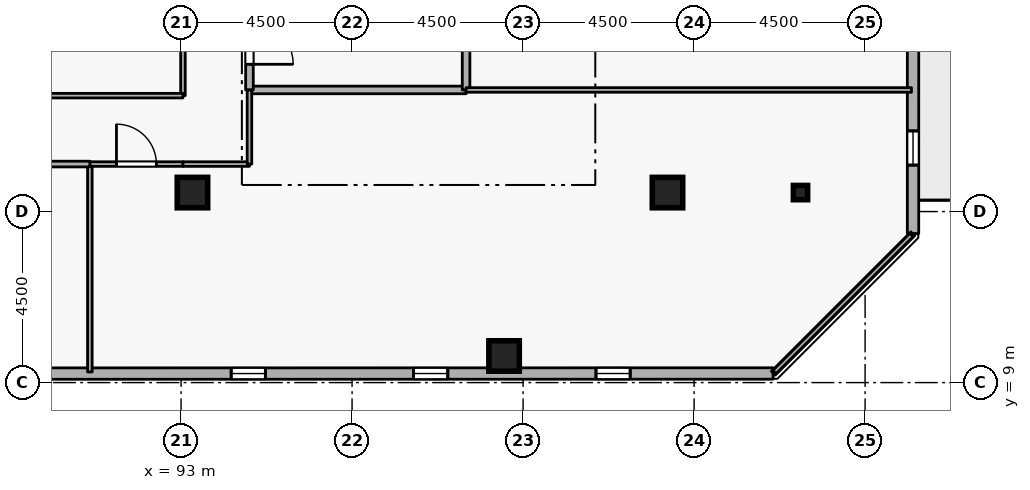
"""IFC4 building model, lengths in metres.
Left out: names, types, materials, properties, quantities, classifications, styles, units other than length and angle.
Written with IfcOpenShell. Run it as: python <this file> out.ifc"""

import sys

from ifc_helpers import new_model, si_unit, direction, frame, frame_2d, origin, origin_2d, place, context, subcontext, project, spatial, rectangle, i_section, extrude, element, fill, save


model = new_model("IFC4")
c1 = context("Model", 3, precision=1e-05, world=origin(), true_north=direction((0.0, 1.0)))
c2 = subcontext(c1, "Body", "Model", "MODEL_VIEW")
j1 = project(units=[si_unit("LENGTHUNIT", "METRE"), si_unit("PLANEANGLEUNIT", "RADIAN")], contexts=[c1])
p1 = place(None, origin())
s1 = spatial("IfcSite", under=j1, at=p1, CompositionType="ELEMENT")
p2 = place(p1, origin())
s2 = spatial("IfcBuilding", under=s1, at=p2, CompositionType="ELEMENT")
p3 = place(p2, frame((0.0, 0.0, 261.9)))
s3 = spatial("IfcBuildingStorey", under=s2, at=p3, CompositionType="ELEMENT", Elevation=261.9)
for number, where, z_axis, x_axis in (
    (1, (105.8, 14.0, 0.0), (0.0, 0.0, 1.0), (1.0, 0.0, 0.0)),
    (2, (101.5, 9.7, 0.0), (0.0, 0.0, 1.0), (1.0, 0.0, 0.0)),
    (3, (93.3, 14.0, 0.0), (0.0, 0.0, 1.0), (1.0, 0.0, 0.0)),
):
    element("IfcColumn", number, at=place(p3, frame(where, z_axis=z_axis, x_axis=x_axis)), inside=s3, PredefinedType="COLUMN", context=c2, shape_type="SweptSolid", body=[
        extrude(rectangle(XDim=0.8, YDim=0.8, at=origin_2d()), origin(), (0.0, 0.0, 1.0), 3.6),
    ])
p4 = place(p3, frame((109.3, 14.0, 0.0), z_axis=(0.0, 0.0, 1.0), x_axis=(1.0, 0.0, 0.0)))
e4 = element("IfcColumn", 4, at=p4, inside=s3, PredefinedType="COLUMN", context=c2, shape_type="SweptSolid", body=[
    extrude(i_section(OverallWidth=0.375, OverallDepth=0.375, WebThickness=0.017, FlangeThickness=0.027, FilletRadius=0.015, at=origin_2d()), origin(), (0.0, 0.0, 1.0), 3.6),
])
p5 = place(p3, frame((73.319, 9.235, 0.0), z_axis=(0.0, 0.0, 1.0), x_axis=(0.999999994606, 0.000103863011, 0.0)))
e5 = element("IfcWall", 5, at=p5, inside=s3, PredefinedType="STANDARD", context=c2, shape_type="SweptSolid", body=[
    extrude(rectangle(XDim=35.259, YDim=0.3, at=frame_2d((17.629, 0.0))), origin(), (0.0, 0.0, 1.0), 2.7),
])
p6 = place(p5, frame((6.6, 0.0, 0.72)))
e6 = element("IfcOpeningElement", 6, at=p6, cuts=e5, PredefinedType="OPENING", context=c2, shape_type="SweptSolid", body=[
    extrude(rectangle(XDim=0.9, YDim=1.75, at=frame_2d((0.45, 0.875))), frame((0.0, 0.16, 0.0), z_axis=(0.0, -1.0, 0.0), x_axis=(1.0, 0.0, 0.0)), (0.0, 0.0, 1.0), 0.32),
])
p7 = place(p5, frame((11.4, 0.0, 0.72)))
e7 = element("IfcOpeningElement", 7, at=p7, cuts=e5, PredefinedType="OPENING", context=c2, shape_type="SweptSolid", body=[
    extrude(rectangle(XDim=0.9, YDim=1.75, at=frame_2d((0.45, 0.875))), frame((0.0, 0.16, 0.0), z_axis=(0.0, -1.0, 0.0), x_axis=(1.0, 0.0, 0.0)), (0.0, 0.0, 1.0), 0.32),
])
p8 = place(p5, frame((21.0, 0.0, 0.72)))
e8 = element("IfcOpeningElement", 8, at=p8, cuts=e5, PredefinedType="OPENING", context=c2, shape_type="SweptSolid", body=[
    extrude(rectangle(XDim=0.9, YDim=1.75, at=frame_2d((0.45, 0.875))), frame((0.0, 0.16, 0.0), z_axis=(0.0, -1.0, 0.0), x_axis=(1.0, 0.0, 0.0)), (0.0, 0.0, 1.0), 0.32),
])
p9 = place(p5, frame((25.8, 0.0, 0.72)))
e9 = element("IfcOpeningElement", 9, at=p9, cuts=e5, PredefinedType="OPENING", context=c2, shape_type="SweptSolid", body=[
    extrude(rectangle(XDim=0.9, YDim=1.75, at=frame_2d((0.45, 0.875))), frame((0.0, 0.16, 0.0), z_axis=(0.0, -1.0, 0.0), x_axis=(1.0, 0.0, 0.0)), (0.0, 0.0, 1.0), 0.32),
])
p10 = place(p5, frame((30.6, 0.0, 0.72)))
e10 = element("IfcOpeningElement", 10, at=p10, cuts=e5, PredefinedType="OPENING", context=c2, shape_type="SweptSolid", body=[
    extrude(rectangle(XDim=0.9, YDim=1.75, at=frame_2d((0.45, 0.875))), frame((0.0, 0.16, 0.0), z_axis=(0.0, -1.0, 0.0), x_axis=(1.0, 0.0, 0.0)), (0.0, 0.0, 1.0), 0.32),
])
p11 = place(p3, frame((112.261, 12.922, 0.0), z_axis=(0.0, 0.0, 1.0), x_axis=(0.000103863011, 0.999999994606, 0.0)))
e11 = element("IfcWall", 11, at=p11, inside=s3, PredefinedType="STANDARD", context=c2, shape_type="SweptSolid", body=[
    extrude(rectangle(XDim=35.259, YDim=0.3, at=frame_2d((17.629, 0.0))), origin(), (0.0, 0.0, 1.0), 2.7),
])
p12 = place(p11, frame((22.58, 0.0, 0.0)))
e12 = element("IfcOpeningElement", 12, at=p12, cuts=e11, PredefinedType="OPENING", context=c2, shape_type="SweptSolid", body=[
    extrude(rectangle(XDim=1.0, YDim=2.08, at=frame_2d((0.5, 1.04))), frame((0.0, 0.16, 0.0), z_axis=(0.0, -1.0, 0.0), x_axis=(1.0, 0.0, 0.0)), (0.0, 0.0, 1.0), 0.32),
])
p13 = place(p11, frame((1.8, 0.0, 0.72)))
e13 = element("IfcOpeningElement", 13, at=p13, cuts=e11, PredefinedType="OPENING", context=c2, shape_type="SweptSolid", body=[
    extrude(rectangle(XDim=0.9, YDim=1.75, at=frame_2d((0.45, 0.875))), frame((0.0, 0.16, 0.0), z_axis=(0.0, -1.0, 0.0), x_axis=(1.0, 0.0, 0.0)), (0.0, 0.0, 1.0), 0.32),
])
p14 = place(p11, frame((6.6, 0.0, 0.72)))
e14 = element("IfcOpeningElement", 14, at=p14, cuts=e11, PredefinedType="OPENING", context=c2, shape_type="SweptSolid", body=[
    extrude(rectangle(XDim=0.9, YDim=1.75, at=frame_2d((0.45, 0.875))), frame((0.0, 0.16, 0.0), z_axis=(0.0, -1.0, 0.0), x_axis=(1.0, 0.0, 0.0)), (0.0, 0.0, 1.0), 0.32),
])
p15 = place(p11, frame((11.4, 0.0, 0.72)))
e15 = element("IfcOpeningElement", 15, at=p15, cuts=e11, PredefinedType="OPENING", context=c2, shape_type="SweptSolid", body=[
    extrude(rectangle(XDim=0.9, YDim=1.75, at=frame_2d((0.45, 0.875))), frame((0.0, 0.16, 0.0), z_axis=(0.0, -1.0, 0.0), x_axis=(1.0, 0.0, 0.0)), (0.0, 0.0, 1.0), 0.32),
])
p16 = place(p11, frame((16.2, 0.0, 0.72)))
e16 = element("IfcOpeningElement", 16, at=p16, cuts=e11, PredefinedType="OPENING", context=c2, shape_type="SweptSolid", body=[
    extrude(rectangle(XDim=0.9, YDim=1.75, at=frame_2d((0.45, 0.875))), frame((0.0, 0.16, 0.0), z_axis=(0.0, -1.0, 0.0), x_axis=(1.0, 0.0, 0.0)), (0.0, 0.0, 1.0), 0.32),
])
p17 = place(p11, frame((25.8, 0.0, 0.72)))
e17 = element("IfcOpeningElement", 17, at=p17, cuts=e11, PredefinedType="OPENING", context=c2, shape_type="SweptSolid", body=[
    extrude(rectangle(XDim=0.9, YDim=1.75, at=frame_2d((0.45, 0.875))), frame((0.0, 0.16, 0.0), z_axis=(0.0, -1.0, 0.0), x_axis=(1.0, 0.0, 0.0)), (0.0, 0.0, 1.0), 0.32),
])
p18 = place(p11, frame((30.6, 0.0, 0.72)))
e18 = element("IfcOpeningElement", 18, at=p18, cuts=e11, PredefinedType="OPENING", context=c2, shape_type="SweptSolid", body=[
    extrude(rectangle(XDim=0.9, YDim=1.75, at=frame_2d((0.45, 0.875))), frame((0.0, 0.16, 0.0), z_axis=(0.0, -1.0, 0.0), x_axis=(1.0, 0.0, 0.0)), (0.0, 0.0, 1.0), 0.32),
])
p19 = place(p3, frame((94.8, 16.7, 0.0), z_axis=(0.0, 0.0, 1.0), x_axis=(1.0, 0.0, 0.0)))
e19 = element("IfcWall", 19, at=p19, inside=s3, PredefinedType="STANDARD", context=c2, shape_type="SweptSolid", body=[
    extrude(rectangle(XDim=5.7, YDim=0.2, at=frame_2d((2.85, 0.0))), origin(), (0.0, 0.0, 1.0), 3.34),
])
p20 = place(p3, frame((100.5, 16.7, 0.0), z_axis=(0.0, 0.0, 1.0), x_axis=(0.0, 1.0, 0.0)))
e20 = element("IfcWall", 20, at=p20, inside=s3, PredefinedType="STANDARD", context=c2, shape_type="SweptSolid", body=[
    extrude(rectangle(XDim=2.5, YDim=0.2, at=frame_2d((1.25, 0.0))), origin(), (0.0, 0.0, 1.0), 3.34),
])
p21 = place(p3, frame((94.8, 19.2, 0.0), z_axis=(0.0, 0.0, 1.0), x_axis=(0.0, -1.0, 0.0)))
e21 = element("IfcWall", 21, at=p21, inside=s3, PredefinedType="STANDARD", context=c2, shape_type="SweptSolid", body=[
    extrude(rectangle(XDim=2.5, YDim=0.2, at=frame_2d((1.25, 0.0))), origin(), (0.0, 0.0, 1.0), 3.34),
])
p22 = place(p21, frame((0.675, 0.0, 0.0)))
e22 = element("IfcOpeningElement", 22, at=p22, cuts=e21, PredefinedType="OPENING", context=c2, shape_type="SweptSolid", body=[
    extrude(rectangle(XDim=1.15, YDim=2.1, at=frame_2d((0.575, 1.05))), frame((0.0, 0.11, 0.0), z_axis=(0.0, -1.0, 0.0), x_axis=(1.0, 0.0, 0.0)), (0.0, 0.0, 1.0), 0.22),
])
p23 = place(p3, frame((90.6, 9.28, 0.0), z_axis=(0.0, 0.0, 1.0), x_axis=(0.0, 1.0, 0.0)))
e23 = element("IfcWall", 23, at=p23, inside=s3, PredefinedType="PARTITIONING", context=c2, shape_type="SweptSolid", body=[
    extrude(rectangle(XDim=5.47, YDim=0.12, at=frame_2d((2.735, 0.0))), origin(), (0.0, 0.0, 1.0), 3.34),
])
p24 = place(p3, frame((90.6, 14.75, 0.0), z_axis=(0.0, 0.0, 1.0), x_axis=(1.0, 0.0, 0.0)))
e24 = element("IfcWall", 24, at=p24, inside=s3, PredefinedType="PARTITIONING", context=c2, shape_type="SweptSolid", body=[
    extrude(rectangle(XDim=2.45, YDim=0.12, at=frame_2d((1.225, 0.0))), origin(), (0.0, 0.0, 1.0), 3.34),
])
p25 = place(p24, frame((0.7, 0.0, 0.0)))
e25 = element("IfcOpeningElement", 25, at=p25, cuts=e24, PredefinedType="OPENING", context=c2, shape_type="SweptSolid", body=[
    extrude(rectangle(XDim=1.05, YDim=2.1, at=frame_2d((0.525, 1.05))), frame((0.0, 0.07, 0.0), z_axis=(0.0, -1.0, 0.0), x_axis=(1.0, 0.0, 0.0)), (0.0, 0.0, 1.0), 0.14),
])
p26 = place(p3, frame((93.05, 14.75, 0.0), z_axis=(0.0, 0.0, 1.0), x_axis=(1.0, 0.0, 0.0)))
e26 = element("IfcWall", 26, at=p26, inside=s3, PredefinedType="PARTITIONING", context=c2, shape_type="SweptSolid", body=[
    extrude(rectangle(XDim=1.75, YDim=0.12, at=frame_2d((0.875, 0.0))), origin(), (0.0, 0.0, 1.0), 3.34),
])
p27 = place(p3, frame((94.8, 14.75, 0.0), z_axis=(0.0, 0.0, 1.0), x_axis=(0.0, 1.0, 0.0)))
e27 = element("IfcWall", 27, at=p27, inside=s3, PredefinedType="PARTITIONING", context=c2, shape_type="SweptSolid", body=[
    extrude(rectangle(XDim=1.95, YDim=0.12, at=frame_2d((0.975, 0.0))), origin(), (0.0, 0.0, 1.0), 3.34),
])
p28 = place(p3, frame((100.5, 16.7, 0.0), z_axis=(0.0, 0.0, 1.0), x_axis=(1.0, 0.0, 0.0)))
e28 = element("IfcWall", 28, at=p28, inside=s3, PredefinedType="PARTITIONING", context=c2, shape_type="SweptSolid", body=[
    extrude(rectangle(XDim=11.72, YDim=0.12, at=frame_2d((5.86, 0.0))), origin(), (0.0, 0.0, 1.0), 3.34),
])
p29 = place(p3, frame((112.22, 12.883, 0.0), z_axis=(0.0, 0.0, 1.0), x_axis=(-0.707106781187, -0.707106781187, 0.0)))
e29 = element("IfcWall", 29, at=p29, inside=s3, PredefinedType="PARTITIONING", context=c2, shape_type="SweptSolid", body=[
    extrude(rectangle(XDim=5.095, YDim=0.12, at=frame_2d((2.547, 0.0))), origin(), (0.0, 0.0, 1.0), 3.34),
])
p30 = place(p3, frame((86.4, 14.75, 0.0), z_axis=(0.0, 0.0, 1.0), x_axis=(1.0, 0.0, 0.0)))
e30 = element("IfcWall", 30, at=p30, inside=s3, PredefinedType="PARTITIONING", context=c2, shape_type="SweptSolid", body=[
    extrude(rectangle(XDim=4.2, YDim=0.15, at=frame_2d((2.1, 0.0))), origin(), (0.0, 0.0, 1.0), 3.34),
])
p31 = place(p30, frame((1.45, 0.0, 0.0)))
e31 = element("IfcOpeningElement", 31, at=p31, cuts=e30, PredefinedType="OPENING", context=c2, shape_type="SweptSolid", body=[
    extrude(rectangle(XDim=1.3, YDim=2.12, at=frame_2d((0.65, 1.06))), frame((0.0, 0.085, 0.0), z_axis=(0.0, -1.0, 0.0), x_axis=(1.0, 0.0, 0.0)), (0.0, 0.0, 1.0), 0.17),
])
p32 = place(p3, frame((93.05, 22.4, 0.0), z_axis=(0.0, 0.0, 1.0), x_axis=(0.0, -1.0, 0.0)))
e32 = element("IfcWall", 32, at=p32, inside=s3, PredefinedType="PARTITIONING", context=c2, shape_type="SweptSolid", body=[
    extrude(rectangle(XDim=5.85, YDim=0.12, at=frame_2d((2.925, 0.0))), origin(), (0.0, 0.0, 1.0), 3.34),
])
p33 = place(p3, frame((93.05, 16.55, 0.0), z_axis=(0.0, 0.0, 1.0), x_axis=(-1.0, 0.0, 0.0)))
e33 = element("IfcWall", 33, at=p33, inside=s3, PredefinedType="PARTITIONING", context=c2, shape_type="SweptSolid", body=[
    extrude(rectangle(XDim=9.1, YDim=0.12, at=frame_2d((4.55, 0.0))), origin(), (0.0, 0.0, 1.0), 3.34),
])
p34 = place(p33, frame((4.075, 0.0, 0.0)))
e34 = element("IfcOpeningElement", 34, at=p34, cuts=e33, PredefinedType="OPENING", context=c2, shape_type="SweptSolid", body=[
    extrude(rectangle(XDim=0.95, YDim=2.1, at=frame_2d((0.475, 1.05))), frame((0.0, 0.07, 0.0), z_axis=(0.0, -1.0, 0.0), x_axis=(1.0, 0.0, 0.0)), (0.0, 0.0, 1.0), 0.14),
])
p35 = place(p8, origin())
e35 = element("IfcWindow", 35, at=p35, inside=s3, PartitioningType="SINGLE_PANEL", PredefinedType="WINDOW", context=c2, shape_type="SweptSolid", body=[
    extrude(rectangle(XDim=0.9, YDim=1.75, at=frame_2d((0.45, 0.875))), frame((0.0, 0.03, 0.0), z_axis=(0.0, -1.0, 0.0), x_axis=(1.0, 0.0, 0.0)), (0.0, 0.0, 1.0), 0.06),
])
fill(e8, e35)
p36 = place(p9, origin())
e36 = element("IfcWindow", 36, at=p36, inside=s3, PartitioningType="SINGLE_PANEL", PredefinedType="WINDOW", context=c2, shape_type="SweptSolid", body=[
    extrude(rectangle(XDim=0.9, YDim=1.75, at=frame_2d((0.45, 0.875))), frame((0.0, 0.03, 0.0), z_axis=(0.0, -1.0, 0.0), x_axis=(1.0, 0.0, 0.0)), (0.0, 0.0, 1.0), 0.06),
])
fill(e9, e36)
p37 = place(p10, origin())
e37 = element("IfcWindow", 37, at=p37, inside=s3, PartitioningType="SINGLE_PANEL", PredefinedType="WINDOW", context=c2, shape_type="SweptSolid", body=[
    extrude(rectangle(XDim=0.9, YDim=1.75, at=frame_2d((0.45, 0.875))), frame((0.0, 0.03, 0.0), z_axis=(0.0, -1.0, 0.0), x_axis=(1.0, 0.0, 0.0)), (0.0, 0.0, 1.0), 0.06),
])
fill(e10, e37)
p38 = place(p13, origin())
e38 = element("IfcWindow", 38, at=p38, inside=s3, PartitioningType="SINGLE_PANEL", PredefinedType="WINDOW", context=c2, shape_type="SweptSolid", body=[
    extrude(rectangle(XDim=0.9, YDim=1.75, at=frame_2d((0.45, 0.875))), frame((0.0, 0.03, 0.0), z_axis=(0.0, -1.0, 0.0), x_axis=(1.0, 0.0, 0.0)), (0.0, 0.0, 1.0), 0.06),
])
fill(e13, e38)
p39 = place(p22, origin())
e39 = element("IfcDoor", 39, at=p39, inside=s3, OperationType="SINGLE_SWING_RIGHT", PredefinedType="DOOR", context=c2, shape_type="SweptSolid", body=[
    extrude(rectangle(XDim=1.15, YDim=2.1, at=frame_2d((0.575, 1.05))), frame((0.0, 0.025, 0.0), z_axis=(0.0, -1.0, 0.0), x_axis=(1.0, 0.0, 0.0)), (0.0, 0.0, 1.0), 0.05),
])
fill(e22, e39)
p40 = place(p25, origin())
e40 = element("IfcDoor", 40, at=p40, inside=s3, OperationType="SINGLE_SWING_LEFT", PredefinedType="DOOR", context=c2, shape_type="SweptSolid", body=[
    extrude(rectangle(XDim=1.05, YDim=2.1, at=frame_2d((0.525, 1.05))), frame((0.0, 0.025, 0.0), z_axis=(0.0, -1.0, 0.0), x_axis=(1.0, 0.0, 0.0)), (0.0, 0.0, 1.0), 0.05),
])
fill(e25, e40)
save(model, sys.argv[1])
